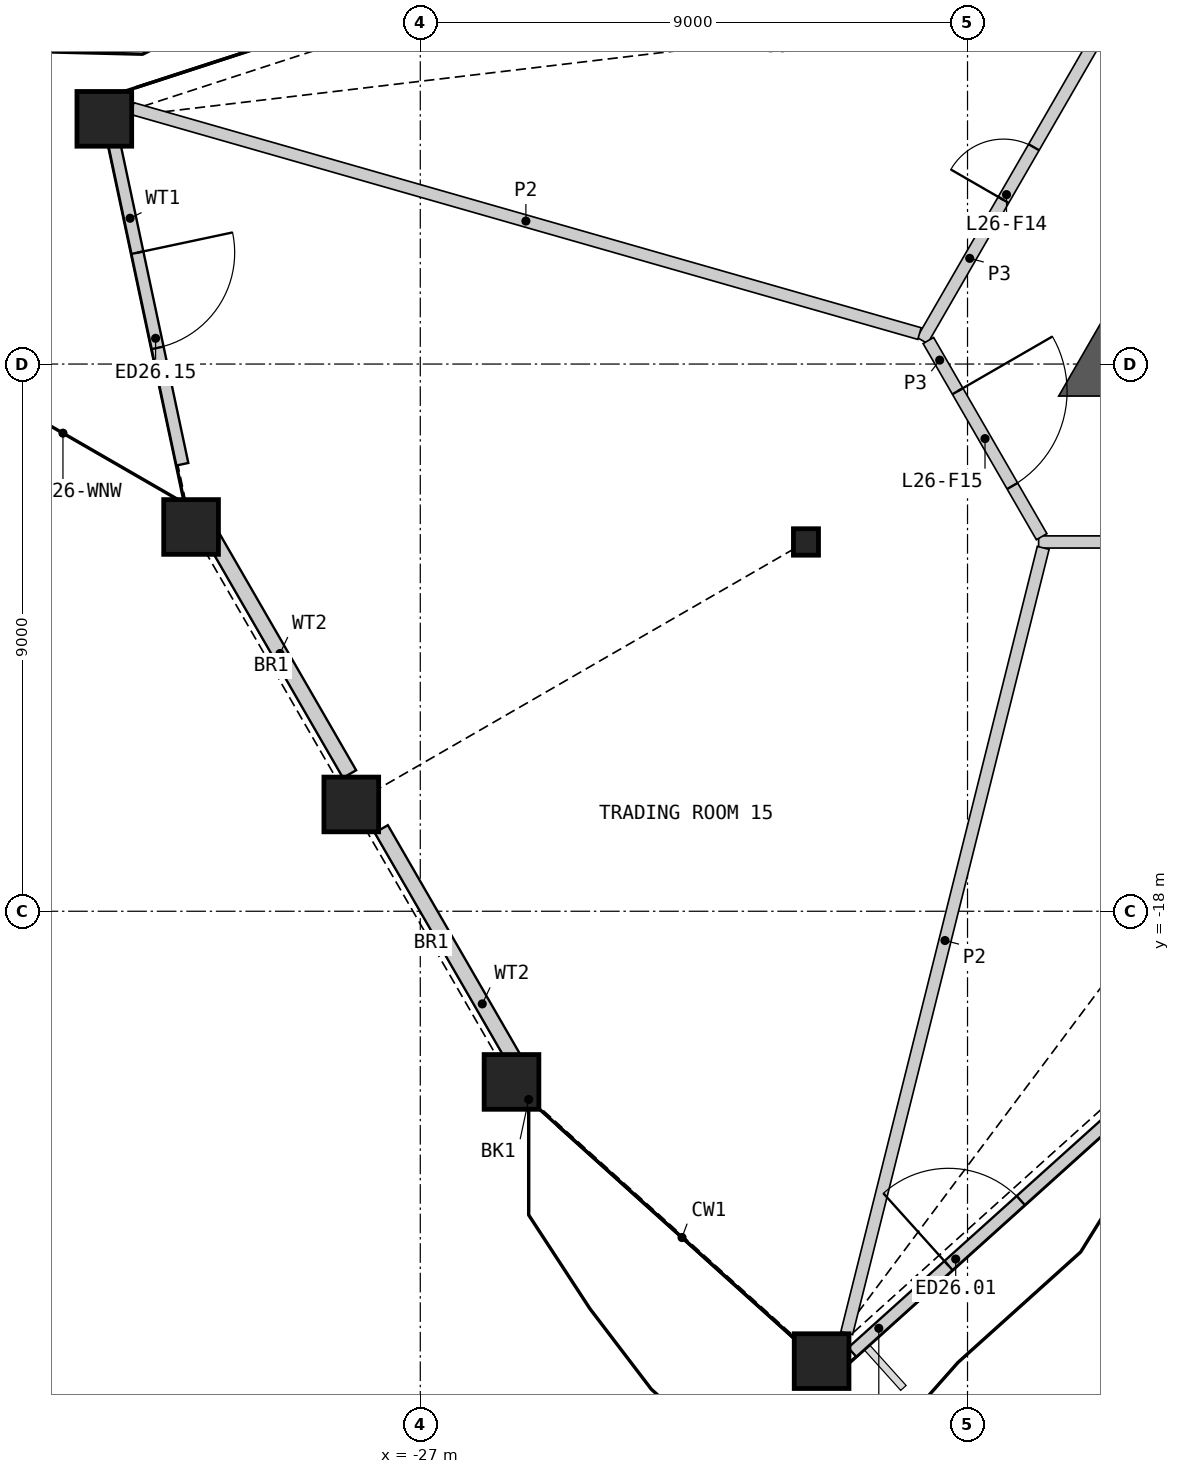
"""IFC4 building model, lengths in metres.
Left out: names, types, materials, properties, quantities, classifications, styles, units other than length and angle.
Written with IfcOpenShell. Run it as: python <this file> out.ifc"""

import sys

from ifc_helpers import new_model, si_unit, direction, frame, frame_2d, origin, origin_2d, place, context, subcontext, project, spatial, polyline, rectangle, hollow_rectangle, i_section, outline, extrude, element, fill, save


model = new_model("IFC4")
c1 = context("Model", 3, precision=1e-05, world=origin(), true_north=direction((0.0, 1.0)))
c2 = subcontext(c1, "Body", "Model", "MODEL_VIEW")
j1 = project(units=[si_unit("LENGTHUNIT", "METRE"), si_unit("PLANEANGLEUNIT", "RADIAN")], contexts=[c1])
p1 = place(None, origin())
s1 = spatial("IfcSite", under=j1, at=p1, CompositionType="ELEMENT")
p2 = place(p1, origin())
s2 = spatial("IfcBuilding", under=s1, at=p2, CompositionType="ELEMENT")
p3 = place(p2, frame((0.0, 0.0, 124.8)))
s3 = spatial("IfcBuildingStorey", under=s2, at=p3, CompositionType="ELEMENT", Elevation=124.8)
for number, where, z_axis, x_axis in (
    (1, (-25.5, -20.807, 0.0), (0.0, 0.0, 1.0), (1.0, 0.0, 0.0)),
    (2, (-20.4, -25.399, 0.0), (0.0, 0.0, 1.0), (1.0, 0.0, 0.0)),
    (3, (-32.196, -4.967, 0.0), (0.0, 0.0, 1.0), (1.0, 0.0, 0.0)),
    (4, (-30.769, -11.68, 0.0), (0.0, 0.0, 1.0), (1.0, 0.0, 0.0)),
    (5, (-28.135, -16.243, 0.0), (0.0, 0.0, 1.0), (1.0, 0.0, 0.0)),
):
    element("IfcColumn", number, at=place(p3, frame(where, z_axis=z_axis, x_axis=x_axis)), inside=s3, PredefinedType="COLUMN", context=c2, shape_type="SweptSolid", body=[
        extrude(hollow_rectangle(XDim=0.9, YDim=0.9, WallThickness=0.06, at=origin_2d()), origin(), (0.0, 0.0, 1.0), 4.2),
    ])
p4 = place(p3, frame((-20.657, -11.926, 0.0), z_axis=(0.0, 0.0, 1.0), x_axis=(1.0, 0.0, 0.0)))
e6 = element("IfcColumn", 6, at=p4, inside=s3, PredefinedType="COLUMN", context=c2, shape_type="SweptSolid", body=[
    extrude(i_section(OverallWidth=0.412, OverallDepth=0.435, WebThickness=0.036, FlangeThickness=0.057, at=origin_2d()), origin(), (0.0, 0.0, 1.0), 4.2),
])
p5 = place(p3, frame((-19.896, -25.253, 0.0), z_axis=(0.0, 0.0, 1.0), x_axis=(0.743157926671, 0.669116055723, 0.0)))
e7 = element("IfcWall", 7, at=p5, inside=s3, PredefinedType="SOLIDWALL", context=c2, shape_type="SweptSolid", body=[
    extrude(rectangle(XDim=5.882, YDim=0.2, at=frame_2d((2.941, 0.0))), origin(), (0.0, 0.0, 1.0), 3.189),
])
p6 = place(p5, frame((2.13, 0.0, 0.0)))
e8 = element("IfcOpeningElement", 8, at=p6, cuts=e7, PredefinedType="OPENING", context=c2, shape_type="SweptSolid", body=[
    extrude(rectangle(XDim=1.6, YDim=2.4, at=frame_2d((0.8, 1.2))), frame((0.0, 0.11, 0.0), z_axis=(0.0, -1.0, 0.0), x_axis=(1.0, 0.0, 0.0)), (0.0, 0.0, 1.0), 0.22),
])
p7 = place(p3, frame((-32.059, -5.254, 0.0), z_axis=(0.0, 0.0, 1.0), x_axis=(0.207902173992, -0.978149623549, 0.0)))
e9 = element("IfcWall", 9, at=p7, inside=s3, PredefinedType="SOLIDWALL", context=c2, shape_type="SweptSolid", body=[
    extrude(rectangle(XDim=5.515, YDim=0.2, at=frame_2d((2.757, 0.0))), origin(), (0.0, 0.0, 1.0), 3.189),
])
p8 = place(p7, frame((1.957, 0.0, 0.0)))
e10 = element("IfcOpeningElement", 10, at=p8, cuts=e9, PredefinedType="OPENING", context=c2, shape_type="SweptSolid", body=[
    extrude(rectangle(XDim=1.6, YDim=2.4, at=frame_2d((0.8, 1.2))), frame((0.0, 0.11, 0.0), z_axis=(0.0, -1.0, 0.0), x_axis=(1.0, 0.0, 0.0)), (0.0, 0.0, 1.0), 0.22),
])
p9 = place(p3, frame((-30.452, -11.779, 0.0), z_axis=(0.0, 0.0, 1.0), x_axis=(0.500016357846, -0.866015959371, 0.0)))
e11 = element("IfcWall", 11, at=p9, inside=s3, PredefinedType="SOLIDWALL", context=c2, shape_type="SweptSolid", body=[
    extrude(rectangle(XDim=4.578, YDim=0.25, at=frame_2d((2.289, 0.0))), origin(), (0.0, 0.0, 1.0), 3.189),
])
p10 = place(p3, frame((-27.641, -16.647, 0.0), z_axis=(0.0, 0.0, 1.0), x_axis=(0.499968989506, -0.866043306961, 0.0)))
e12 = element("IfcWall", 12, at=p10, inside=s3, PredefinedType="SOLIDWALL", context=c2, shape_type="SweptSolid", body=[
    extrude(rectangle(XDim=4.429, YDim=0.25, at=frame_2d((2.214, 0.0))), origin(), (0.0, 0.0, 1.0), 3.189),
])
p11 = place(p3, origin())
e13 = element("IfcWall", 13, at=p11, inside=s3, PredefinedType="SHEAR", context=c2, shape_type="SweptSolid", body=[
    extrude(outline(polyline([(-14.941, -8.626), (-14.941, -9.526), (-16.5, -9.526), (-15.721, -8.176), (-14.941, -8.626)])), origin(), (0.0, 0.0, 1.0), 3.8),
])
p12 = place(p3, frame((-16.831, -11.926, 0.0), z_axis=(0.0, 0.0, 1.0), x_axis=(1.0, 0.0, 0.0)))
e14 = element("IfcWall", 14, at=p12, inside=s3, PredefinedType="PARTITIONING", context=c2, shape_type="SweptSolid", body=[
    extrude(rectangle(XDim=6.275, YDim=0.2, at=frame_2d((3.137, 0.0))), origin(), (0.0, 0.0, 1.0), 3.8),
])
p13 = place(p12, frame((2.688, 0.0, 0.0)))
e15 = element("IfcOpeningElement", 15, at=p13, cuts=e14, PredefinedType="OPENING", context=c2, shape_type="SweptSolid", body=[
    extrude(rectangle(XDim=1.0, YDim=2.1, at=frame_2d((0.5, 1.05))), frame((0.0, 0.11, 0.0), z_axis=(0.0, -1.0, 0.0), x_axis=(1.0, 0.0, 0.0)), (0.0, 0.0, 1.0), 0.22),
])
p14 = place(p3, frame((-18.744, -8.613, 0.0), z_axis=(0.0, 0.0, 1.0), x_axis=(0.499997920671, 0.866026604282, 0.0)))
e16 = element("IfcWall", 16, at=p14, inside=s3, PredefinedType="PARTITIONING", context=c2, shape_type="SweptSolid", body=[
    extrude(rectangle(XDim=6.24, YDim=0.2, at=frame_2d((3.12, 0.0))), origin(), (0.0, 0.0, 1.0), 3.8),
])
p15 = place(p14, frame((2.67, 0.0, 0.0)))
e17 = element("IfcOpeningElement", 17, at=p15, cuts=e16, PredefinedType="OPENING", context=c2, shape_type="SweptSolid", body=[
    extrude(rectangle(XDim=1.0, YDim=2.1, at=frame_2d((0.5, 1.05))), frame((0.0, 0.11, 0.0), z_axis=(0.0, -1.0, 0.0), x_axis=(1.0, 0.0, 0.0)), (0.0, 0.0, 1.0), 0.22),
])
p16 = place(p3, frame((-18.644, -8.613, 0.0), z_axis=(0.0, 0.0, 1.0), x_axis=(0.499958791762, -0.866049194065, 0.0)))
e18 = element("IfcWall", 18, at=p16, inside=s3, PredefinedType="PARTITIONING", context=c2, shape_type="SweptSolid", body=[
    extrude(rectangle(XDim=3.726, YDim=0.2, at=frame_2d((1.863, 0.0))), origin(), (0.0, 0.0, 1.0), 3.8),
])
p17 = place(p16, frame((0.963, 0.0, 0.0)))
e19 = element("IfcOpeningElement", 19, at=p17, cuts=e18, PredefinedType="OPENING", context=c2, shape_type="SweptSolid", body=[
    extrude(rectangle(XDim=1.8, YDim=2.1, at=frame_2d((0.9, 1.05))), frame((0.0, 0.11, 0.0), z_axis=(0.0, -1.0, 0.0), x_axis=(1.0, 0.0, 0.0)), (0.0, 0.0, 1.0), 0.22),
])
p18 = place(p3, frame((-31.736, -4.798, 0.0), z_axis=(0.0, 0.0, 1.0), x_axis=(0.961478776026, -0.274879179372, 0.0)))
e20 = element("IfcWall", 20, at=p18, inside=s3, PredefinedType="PARTITIONING", context=c2, shape_type="SweptSolid", body=[
    extrude(rectangle(XDim=13.465, YDim=0.2, at=frame_2d((6.732, 0.0))), origin(), (0.0, 0.0, 1.0), 2.885),
])
p19 = place(p3, frame((-19.987, -24.939, 0.0), z_axis=(0.0, 0.0, 1.0), x_axis=(0.242708204495, 0.97009933897, 0.0)))
e21 = element("IfcWall", 21, at=p19, inside=s3, PredefinedType="PARTITIONING", context=c2, shape_type="SweptSolid", body=[
    extrude(rectangle(XDim=13.314, YDim=0.2, at=frame_2d((6.657, 0.0))), origin(), (0.0, 0.0, 1.0), 2.885),
])
p20 = place(p6, origin())
e22 = element("IfcDoor", 22, at=p20, inside=s3, OperationType="DOUBLE_DOOR_SINGLE_SWING", PredefinedType="DOOR", context=c2, shape_type="SweptSolid", body=[
    extrude(rectangle(XDim=1.6, YDim=2.4, at=frame_2d((0.8, 1.2))), frame((0.0, 0.025, 0.0), z_axis=(0.0, -1.0, 0.0), x_axis=(1.0, 0.0, 0.0)), (0.0, 0.0, 1.0), 0.05),
])
fill(e8, e22)
p21 = place(p8, origin())
e23 = element("IfcDoor", 23, at=p21, inside=s3, OperationType="DOUBLE_DOOR_SINGLE_SWING", PredefinedType="DOOR", context=c2, shape_type="SweptSolid", body=[
    extrude(rectangle(XDim=1.6, YDim=2.4, at=frame_2d((0.8, 1.2))), frame((0.0, 0.025, 0.0), z_axis=(0.0, -1.0, 0.0), x_axis=(1.0, 0.0, 0.0)), (0.0, 0.0, 1.0), 0.05),
])
fill(e10, e23)
p22 = place(p15, origin())
e24 = element("IfcDoor", 24, at=p22, inside=s3, OperationType="SINGLE_SWING_LEFT", PredefinedType="DOOR", context=c2, shape_type="SweptSolid", body=[
    extrude(rectangle(XDim=1.0, YDim=2.1, at=frame_2d((0.5, 1.05))), frame((0.0, 0.025, 0.0), z_axis=(0.0, -1.0, 0.0), x_axis=(1.0, 0.0, 0.0)), (0.0, 0.0, 1.0), 0.05),
])
fill(e17, e24)
p23 = place(p17, origin())
e25 = element("IfcDoor", 25, at=p23, inside=s3, OperationType="DOUBLE_DOOR_SINGLE_SWING", PredefinedType="DOOR", context=c2, shape_type="SweptSolid", body=[
    extrude(rectangle(XDim=1.8, YDim=2.1, at=frame_2d((0.9, 1.05))), frame((0.0, 0.025, 0.0), z_axis=(0.0, -1.0, 0.0), x_axis=(1.0, 0.0, 0.0)), (0.0, 0.0, 1.0), 0.05),
])
fill(e19, e25)
save(model, sys.argv[1])
